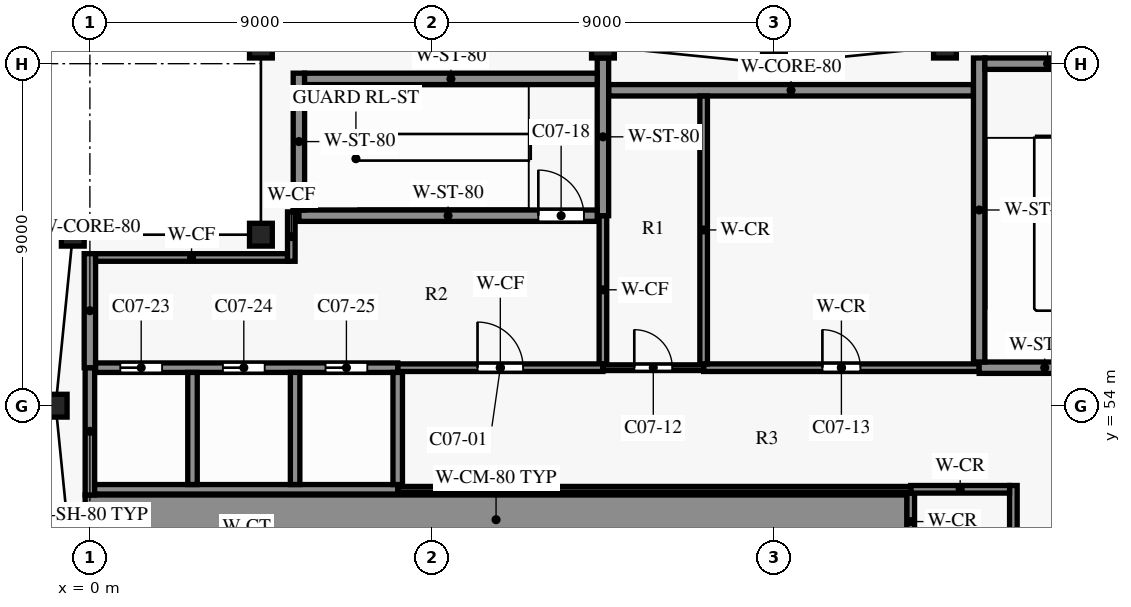
"""IFC4 building model, lengths in metres.
Left out: names, types, materials, properties, quantities, classifications, styles, units other than length and angle.
Written with IfcOpenShell. Run it as: python <this file> out.ifc"""

import sys

from ifc_helpers import new_model, si_unit, direction, frame, frame_2d, origin, origin_2d, place, context, subcontext, project, spatial, rectangle, hollow_rectangle, extrude, element, fill, save


model = new_model("IFC4")
c1 = context("Model", 3, precision=1e-05, world=origin(), true_north=direction((0.0, 1.0)))
c2 = subcontext(c1, "Body", "Model", "MODEL_VIEW")
j1 = project(units=[si_unit("LENGTHUNIT", "METRE"), si_unit("PLANEANGLEUNIT", "RADIAN")], contexts=[c1])
p1 = place(None, origin())
s1 = spatial("IfcSite", under=j1, at=p1, CompositionType="ELEMENT")
p2 = place(p1, origin())
s2 = spatial("IfcBuilding", under=s1, at=p2, CompositionType="ELEMENT")
p3 = place(p2, frame((0.0, 0.0, 32.0)))
s3 = spatial("IfcBuildingStorey", under=s2, at=p3, CompositionType="ELEMENT", Elevation=32.0)
for number, where, z_axis, x_axis in (
    (1, (4.5, 58.5, 0.0), (0.0, 0.0, 1.0), (1.0, 0.0, 0.0)),
    (2, (4.5, 63.45, 0.0), (0.0, 0.0, 1.0), (1.0, 0.0, 0.0)),
    (3, (13.5, 63.45, 0.0), (0.0, 0.0, 1.0), (1.0, 0.0, 0.0)),
    (4, (18.0, 63.0, 0.0), (0.0, 0.0, 1.0), (1.0, 0.0, 0.0)),
    (5, (22.5, 63.45, 0.0), (0.0, 0.0, 1.0), (1.0, 0.0, 0.0)),
    (6, (-0.45, 58.5, 0.0), (0.0, 0.0, 1.0), (1.0, 0.0, 0.0)),
    (7, (-0.9, 54.0, 0.0), (0.0, 0.0, 1.0), (1.0, 0.0, 0.0)),
):
    element("IfcColumn", number, at=place(p3, frame(where, z_axis=z_axis, x_axis=x_axis)), inside=s3, PredefinedType="COLUMN", context=c2, shape_type="SweptSolid", body=[
        extrude(hollow_rectangle(XDim=0.6, YDim=0.6, WallThickness=0.03, InnerFilletRadius=0.03, OuterFilletRadius=0.06, at=origin_2d()), origin(), (0.0, 0.0, 1.0), 5.5),
    ])
p4 = place(p3, frame((-0.125, 51.0, 0.0), z_axis=(0.0, 0.0, 1.0), x_axis=(1.0, 0.0, 0.0)))
e8 = element("IfcWall", 8, at=p4, inside=s3, PredefinedType="SHEAR", context=c2, shape_type="SweptSolid", body=[
    extrude(rectangle(XDim=21.625, YDim=1.3, at=frame_2d((10.812, 0.0))), origin(), (0.0, 0.0, 1.0), 5.2),
])
p5 = place(p3, frame((8.1, 51.8, 0.0), z_axis=(0.0, 0.0, 1.0), x_axis=(1.0, 0.0, 0.0)))
e9 = element("IfcWall", 9, at=p5, inside=s3, PredefinedType="PARTITIONING", context=c2, shape_type="SweptSolid", body=[
    extrude(rectangle(XDim=13.5, YDim=0.15, at=frame_2d((6.75, 0.0))), origin(), (0.0, 0.0, 1.0), 5.2),
])
p6 = place(p3, frame((21.6, 51.8, 0.0), z_axis=(0.0, 0.0, 1.0), x_axis=(1.0, 0.0, 0.0)))
e10 = element("IfcWall", 10, at=p6, inside=s3, PredefinedType="PARTITIONING", context=c2, shape_type="SweptSolid", body=[
    extrude(rectangle(XDim=2.6, YDim=0.2, at=frame_2d((1.3, 0.0))), origin(), (0.0, 0.0, 1.0), 5.2),
])
p7 = place(p3, frame((0.125, 51.8, 0.0), z_axis=(0.0, 0.0, 1.0), x_axis=(1.0, 0.0, 0.0)))
e11 = element("IfcWall", 11, at=p7, inside=s3, PredefinedType="SHEAR", context=c2, shape_type="SweptSolid", body=[
    extrude(rectangle(XDim=7.975, YDim=0.25, at=frame_2d((3.988, 0.0))), origin(), (0.0, 0.0, 1.0), 5.2),
])
p8 = place(p3, frame((8.1, 55.0, 0.0), z_axis=(0.0, 0.0, 1.0), x_axis=(1.0, 0.0, 0.0)))
e12 = element("IfcWall", 12, at=p8, inside=s3, PredefinedType="PARTITIONING", context=c2, shape_type="SweptSolid", body=[
    extrude(rectangle(XDim=5.4, YDim=0.2, at=frame_2d((2.7, 0.0))), origin(), (0.0, 0.0, 1.0), 5.2),
])
p9 = place(p8, frame((2.1, 0.0, 0.0)))
e13 = element("IfcOpeningElement", 13, at=p9, cuts=e12, PredefinedType="OPENING", context=c2, shape_type="SweptSolid", body=[
    extrude(rectangle(XDim=1.2, YDim=2.2, at=frame_2d((0.6, 1.1))), frame((0.0, 0.11, 0.0), z_axis=(0.0, -1.0, 0.0), x_axis=(1.0, 0.0, 0.0)), (0.0, 0.0, 1.0), 0.22),
])
p10 = place(p3, frame((13.5, 55.0, 0.0), z_axis=(0.0, 0.0, 1.0), x_axis=(1.0, 0.0, 0.0)))
e14 = element("IfcWall", 14, at=p10, inside=s3, PredefinedType="PARTITIONING", context=c2, shape_type="SweptSolid", body=[
    extrude(rectangle(XDim=2.65, YDim=0.15, at=frame_2d((1.325, 0.0))), origin(), (0.0, 0.0, 1.0), 5.2),
])
p11 = place(p10, frame((0.825, 0.0, 0.0)))
e15 = element("IfcOpeningElement", 15, at=p11, cuts=e14, PredefinedType="OPENING", context=c2, shape_type="SweptSolid", body=[
    extrude(rectangle(XDim=1.0, YDim=2.1, at=frame_2d((0.5, 1.05))), frame((0.0, 0.085, 0.0), z_axis=(0.0, -1.0, 0.0), x_axis=(1.0, 0.0, 0.0)), (0.0, 0.0, 1.0), 0.17),
])
p12 = place(p3, frame((16.15, 55.0, 0.0), z_axis=(0.0, 0.0, 1.0), x_axis=(1.0, 0.0, 0.0)))
e16 = element("IfcWall", 16, at=p12, inside=s3, PredefinedType="PARTITIONING", context=c2, shape_type="SweptSolid", body=[
    extrude(rectangle(XDim=7.25, YDim=0.2, at=frame_2d((3.625, 0.0))), origin(), (0.0, 0.0, 1.0), 5.2),
])
p13 = place(p12, frame((3.125, 0.0, 0.0)))
e17 = element("IfcOpeningElement", 17, at=p13, cuts=e16, PredefinedType="OPENING", context=c2, shape_type="SweptSolid", body=[
    extrude(rectangle(XDim=1.0, YDim=2.1, at=frame_2d((0.5, 1.05))), frame((0.0, 0.11, 0.0), z_axis=(0.0, -1.0, 0.0), x_axis=(1.0, 0.0, 0.0)), (0.0, 0.0, 1.0), 0.22),
])
p14 = place(p3, frame((0.15, 55.0, 0.0), z_axis=(0.0, 0.0, 1.0), x_axis=(1.0, 0.0, 0.0)))
e18 = element("IfcWall", 18, at=p14, inside=s3, PredefinedType="SHEAR", context=c2, shape_type="SweptSolid", body=[
    extrude(rectangle(XDim=7.95, YDim=0.25, at=frame_2d((3.975, 0.0))), origin(), (0.0, 0.0, 1.0), 5.2),
])
p15 = place(p14, frame((0.65, 0.0, 0.0)))
e19 = element("IfcOpeningElement", 19, at=p15, cuts=e18, PredefinedType="OPENING", context=c2, shape_type="SweptSolid", body=[
    extrude(rectangle(XDim=1.1, YDim=2.1, at=frame_2d((0.55, 1.05))), frame((0.0, 0.135, 0.0), z_axis=(0.0, -1.0, 0.0), x_axis=(1.0, 0.0, 0.0)), (0.0, 0.0, 1.0), 0.27),
])
p16 = place(p14, frame((3.35, 0.0, 0.0)))
e20 = element("IfcOpeningElement", 20, at=p16, cuts=e18, PredefinedType="OPENING", context=c2, shape_type="SweptSolid", body=[
    extrude(rectangle(XDim=1.1, YDim=2.1, at=frame_2d((0.55, 1.05))), frame((0.0, 0.135, 0.0), z_axis=(0.0, -1.0, 0.0), x_axis=(1.0, 0.0, 0.0)), (0.0, 0.0, 1.0), 0.27),
])
p17 = place(p14, frame((6.05, 0.0, 0.0)))
e21 = element("IfcOpeningElement", 21, at=p17, cuts=e18, PredefinedType="OPENING", context=c2, shape_type="SweptSolid", body=[
    extrude(rectangle(XDim=1.1, YDim=2.1, at=frame_2d((0.55, 1.05))), frame((0.0, 0.135, 0.0), z_axis=(0.0, -1.0, 0.0), x_axis=(1.0, 0.0, 0.0)), (0.0, 0.0, 1.0), 0.27),
])
p18 = place(p3, frame((23.4, 55.0, 0.0), z_axis=(0.0, 0.0, 1.0), x_axis=(1.0, 0.0, 0.0)))
e22 = element("IfcWall", 22, at=p18, inside=s3, PredefinedType="SHEAR", context=c2, shape_type="SweptSolid", body=[
    extrude(rectangle(XDim=3.45, YDim=0.3, at=frame_2d((1.725, 0.0))), origin(), (0.0, 0.0, 1.0), 5.2),
])
p19 = place(p3, frame((0.15, 57.9, 0.0), z_axis=(0.0, 0.0, 1.0), x_axis=(1.0, 0.0, 0.0)))
e23 = element("IfcWall", 23, at=p19, inside=s3, PredefinedType="PARTITIONING", context=c2, shape_type="SweptSolid", body=[
    extrude(rectangle(XDim=5.05, YDim=0.2, at=frame_2d((2.525, 0.0))), origin(), (0.0, 0.0, 1.0), 5.2),
])
p20 = place(p3, frame((5.5, 59.0, 0.0), z_axis=(0.0, 0.0, 1.0), x_axis=(1.0, 0.0, 0.0)))
e24 = element("IfcWall", 24, at=p20, inside=s3, PredefinedType="SHEAR", context=c2, shape_type="SweptSolid", body=[
    extrude(rectangle(XDim=7.85, YDim=0.3, at=frame_2d((3.925, 0.0))), origin(), (0.0, 0.0, 1.0), 5.2),
])
p21 = place(p20, frame((6.3, 0.0, 0.0)))
e25 = element("IfcOpeningElement", 25, at=p21, cuts=e24, PredefinedType="OPENING", context=c2, shape_type="SweptSolid", body=[
    extrude(rectangle(XDim=1.2, YDim=2.2, at=frame_2d((0.6, 1.1))), frame((0.0, 0.16, 0.0), z_axis=(0.0, -1.0, 0.0), x_axis=(1.0, 0.0, 0.0)), (0.0, 0.0, 1.0), 0.32),
])
p22 = place(p3, frame((13.65, 62.3, 0.0), z_axis=(0.0, 0.0, 1.0), x_axis=(1.0, 0.0, 0.0)))
e26 = element("IfcWall", 26, at=p22, inside=s3, PredefinedType="SHEAR", context=c2, shape_type="SweptSolid", body=[
    extrude(rectangle(XDim=9.6, YDim=0.3, at=frame_2d((4.8, 0.0))), origin(), (0.0, 0.0, 1.0), 5.2),
])
p23 = place(p3, frame((5.65, 62.6, 0.0), z_axis=(0.0, 0.0, 1.0), x_axis=(1.0, 0.0, 0.0)))
e27 = element("IfcWall", 27, at=p23, inside=s3, PredefinedType="SHEAR", context=c2, shape_type="SweptSolid", body=[
    extrude(rectangle(XDim=7.7, YDim=0.3, at=frame_2d((3.85, 0.0))), origin(), (0.0, 0.0, 1.0), 5.2),
])
p24 = place(p3, frame((23.55, 63.0, 0.0), z_axis=(0.0, 0.0, 1.0), x_axis=(1.0, 0.0, 0.0)))
e28 = element("IfcWall", 28, at=p24, inside=s3, PredefinedType="SHEAR", context=c2, shape_type="SweptSolid", body=[
    extrude(rectangle(XDim=3.3, YDim=0.3, at=frame_2d((1.65, 0.0))), origin(), (0.0, 0.0, 1.0), 5.2),
])
p25 = place(p3, frame((0.0, 55.0, 0.0), z_axis=(0.0, 0.0, 1.0), x_axis=(0.0, 1.0, 0.0)))
e29 = element("IfcWall", 29, at=p25, inside=s3, PredefinedType="SHEAR", context=c2, shape_type="SweptSolid", body=[
    extrude(rectangle(XDim=3.0, YDim=0.3, at=frame_2d((1.5, 0.0))), origin(), (0.0, 0.0, 1.0), 5.2),
])
p26 = place(p3, frame((0.0, 51.65, 0.0), z_axis=(0.0, 0.0, 1.0), x_axis=(0.0, 1.0, 0.0)))
e30 = element("IfcWall", 30, at=p26, inside=s3, PredefinedType="SHEAR", context=c2, shape_type="SweptSolid", body=[
    extrude(rectangle(XDim=3.35, YDim=0.25, at=frame_2d((1.675, 0.0))), origin(), (0.0, 0.0, 1.0), 5.2),
])
p27 = place(p3, frame((2.7, 51.925, 0.0), z_axis=(0.0, 0.0, 1.0), x_axis=(0.0, 1.0, 0.0)))
e31 = element("IfcWall", 31, at=p27, inside=s3, PredefinedType="SHEAR", context=c2, shape_type="SweptSolid", body=[
    extrude(rectangle(XDim=2.95, YDim=0.25, at=frame_2d((1.475, 0.0))), origin(), (0.0, 0.0, 1.0), 5.2),
])
p28 = place(p3, frame((5.3, 57.8, 0.0), z_axis=(0.0, 0.0, 1.0), x_axis=(0.0, 1.0, 0.0)))
e32 = element("IfcWall", 32, at=p28, inside=s3, PredefinedType="PARTITIONING", context=c2, shape_type="SweptSolid", body=[
    extrude(rectangle(XDim=1.3, YDim=0.2, at=frame_2d((0.65, 0.0))), origin(), (0.0, 0.0, 1.0), 5.2),
])
p29 = place(p3, frame((5.4, 51.925, 0.0), z_axis=(0.0, 0.0, 1.0), x_axis=(0.0, 1.0, 0.0)))
e33 = element("IfcWall", 33, at=p29, inside=s3, PredefinedType="SHEAR", context=c2, shape_type="SweptSolid", body=[
    extrude(rectangle(XDim=2.95, YDim=0.25, at=frame_2d((1.475, 0.0))), origin(), (0.0, 0.0, 1.0), 5.2),
])
p30 = place(p3, frame((5.5, 59.15, 0.0), z_axis=(0.0, 0.0, 1.0), x_axis=(0.0, 1.0, 0.0)))
e34 = element("IfcWall", 34, at=p30, inside=s3, PredefinedType="SHEAR", context=c2, shape_type="SweptSolid", body=[
    extrude(rectangle(XDim=3.6, YDim=0.3, at=frame_2d((1.8, 0.0))), origin(), (0.0, 0.0, 1.0), 5.2),
])
p31 = place(p3, frame((8.1, 51.925, 0.0), z_axis=(0.0, 0.0, 1.0), x_axis=(0.0, 1.0, 0.0)))
e35 = element("IfcWall", 35, at=p31, inside=s3, PredefinedType="SHEAR", context=c2, shape_type="SweptSolid", body=[
    extrude(rectangle(XDim=2.95, YDim=0.25, at=frame_2d((1.475, 0.0))), origin(), (0.0, 0.0, 1.0), 5.2),
])
p32 = place(p3, frame((13.5, 55.1, 0.0), z_axis=(0.0, 0.0, 1.0), x_axis=(0.0, 1.0, 0.0)))
e36 = element("IfcWall", 36, at=p32, inside=s3, PredefinedType="PARTITIONING", context=c2, shape_type="SweptSolid", body=[
    extrude(rectangle(XDim=3.9, YDim=0.2, at=frame_2d((1.95, 0.0))), origin(), (0.0, 0.0, 1.0), 5.2),
])
p33 = place(p3, frame((13.5, 59.0, 0.0), z_axis=(0.0, 0.0, 1.0), x_axis=(0.0, 1.0, 0.0)))
e37 = element("IfcWall", 37, at=p33, inside=s3, PredefinedType="SHEAR", context=c2, shape_type="SweptSolid", body=[
    extrude(rectangle(XDim=4.15, YDim=0.3, at=frame_2d((2.075, 0.0))), origin(), (0.0, 0.0, 1.0), 5.2),
])
p34 = place(p3, frame((16.15, 55.1, 0.0), z_axis=(0.0, 0.0, 1.0), x_axis=(0.0, 1.0, 0.0)))
e38 = element("IfcWall", 38, at=p34, inside=s3, PredefinedType="PARTITIONING", context=c2, shape_type="SweptSolid", body=[
    extrude(rectangle(XDim=7.05, YDim=0.2, at=frame_2d((3.525, 0.0))), origin(), (0.0, 0.0, 1.0), 5.2),
])
p35 = place(p3, frame((21.6, 50.2, 0.0), z_axis=(0.0, 0.0, 1.0), x_axis=(0.0, 1.0, 0.0)))
e39 = element("IfcWall", 39, at=p35, inside=s3, PredefinedType="PARTITIONING", context=c2, shape_type="SweptSolid", body=[
    extrude(rectangle(XDim=1.5, YDim=0.2, at=frame_2d((0.75, 0.0))), origin(), (0.0, 0.0, 1.0), 5.2),
])
p36 = place(p3, frame((23.4, 55.15, 0.0), z_axis=(0.0, 0.0, 1.0), x_axis=(0.0, 1.0, 0.0)))
e40 = element("IfcWall", 40, at=p36, inside=s3, PredefinedType="SHEAR", context=c2, shape_type="SweptSolid", body=[
    extrude(rectangle(XDim=8.0, YDim=0.3, at=frame_2d((4.0, 0.0))), origin(), (0.0, 0.0, 1.0), 5.2),
])
p37 = place(p3, frame((24.3, 46.9, 0.0), z_axis=(0.0, 0.0, 1.0), x_axis=(0.0, 1.0, 0.0)))
e41 = element("IfcWall", 41, at=p37, inside=s3, PredefinedType="SHEAR", context=c2, shape_type="SweptSolid", body=[
    extrude(rectangle(XDim=5.0, YDim=0.2, at=frame_2d((2.5, 0.0))), origin(), (0.0, 0.0, 1.0), 5.2),
])
p38 = place(p9, origin())
e42 = element("IfcDoor", 42, at=p38, inside=s3, OperationType="SINGLE_SWING_RIGHT", PredefinedType="DOOR", context=c2, shape_type="SweptSolid", body=[
    extrude(rectangle(XDim=1.2, YDim=2.2, at=frame_2d((0.6, 1.1))), frame((0.0, 0.025, 0.0), z_axis=(0.0, -1.0, 0.0), x_axis=(1.0, 0.0, 0.0)), (0.0, 0.0, 1.0), 0.05),
])
fill(e13, e42)
p39 = place(p11, origin())
e43 = element("IfcDoor", 43, at=p39, inside=s3, OperationType="SINGLE_SWING_LEFT", PredefinedType="DOOR", context=c2, shape_type="SweptSolid", body=[
    extrude(rectangle(XDim=1.0, YDim=2.1, at=frame_2d((0.5, 1.05))), frame((0.0, 0.025, 0.0), z_axis=(0.0, -1.0, 0.0), x_axis=(1.0, 0.0, 0.0)), (0.0, 0.0, 1.0), 0.05),
])
fill(e15, e43)
p40 = place(p13, origin())
e44 = element("IfcDoor", 44, at=p40, inside=s3, OperationType="SINGLE_SWING_RIGHT", PredefinedType="DOOR", context=c2, shape_type="SweptSolid", body=[
    extrude(rectangle(XDim=1.0, YDim=2.1, at=frame_2d((0.5, 1.05))), frame((0.0, 0.025, 0.0), z_axis=(0.0, -1.0, 0.0), x_axis=(1.0, 0.0, 0.0)), (0.0, 0.0, 1.0), 0.05),
])
fill(e17, e44)
p41 = place(p21, origin())
e45 = element("IfcDoor", 45, at=p41, inside=s3, OperationType="SINGLE_SWING_RIGHT", PredefinedType="DOOR", context=c2, shape_type="SweptSolid", body=[
    extrude(rectangle(XDim=1.2, YDim=2.2, at=frame_2d((0.6, 1.1))), frame((0.0, 0.025, 0.0), z_axis=(0.0, -1.0, 0.0), x_axis=(1.0, 0.0, 0.0)), (0.0, 0.0, 1.0), 0.05),
])
fill(e25, e45)
p42 = place(p15, origin())
e46 = element("IfcDoor", 46, at=p42, inside=s3, OperationType="DOUBLE_DOOR_SLIDING", PredefinedType="DOOR", context=c2, shape_type="SweptSolid", body=[
    extrude(rectangle(XDim=1.1, YDim=2.1, at=frame_2d((0.55, 1.05))), frame((0.0, 0.025, 0.0), z_axis=(0.0, -1.0, 0.0), x_axis=(1.0, 0.0, 0.0)), (0.0, 0.0, 1.0), 0.05),
])
fill(e19, e46)
p43 = place(p16, origin())
e47 = element("IfcDoor", 47, at=p43, inside=s3, OperationType="DOUBLE_DOOR_SLIDING", PredefinedType="DOOR", context=c2, shape_type="SweptSolid", body=[
    extrude(rectangle(XDim=1.1, YDim=2.1, at=frame_2d((0.55, 1.05))), frame((0.0, 0.025, 0.0), z_axis=(0.0, -1.0, 0.0), x_axis=(1.0, 0.0, 0.0)), (0.0, 0.0, 1.0), 0.05),
])
fill(e20, e47)
p44 = place(p17, origin())
e48 = element("IfcDoor", 48, at=p44, inside=s3, OperationType="DOUBLE_DOOR_SLIDING", PredefinedType="DOOR", context=c2, shape_type="SweptSolid", body=[
    extrude(rectangle(XDim=1.1, YDim=2.1, at=frame_2d((0.55, 1.05))), frame((0.0, 0.025, 0.0), z_axis=(0.0, -1.0, 0.0), x_axis=(1.0, 0.0, 0.0)), (0.0, 0.0, 1.0), 0.05),
])
fill(e21, e48)
save(model, sys.argv[1])
